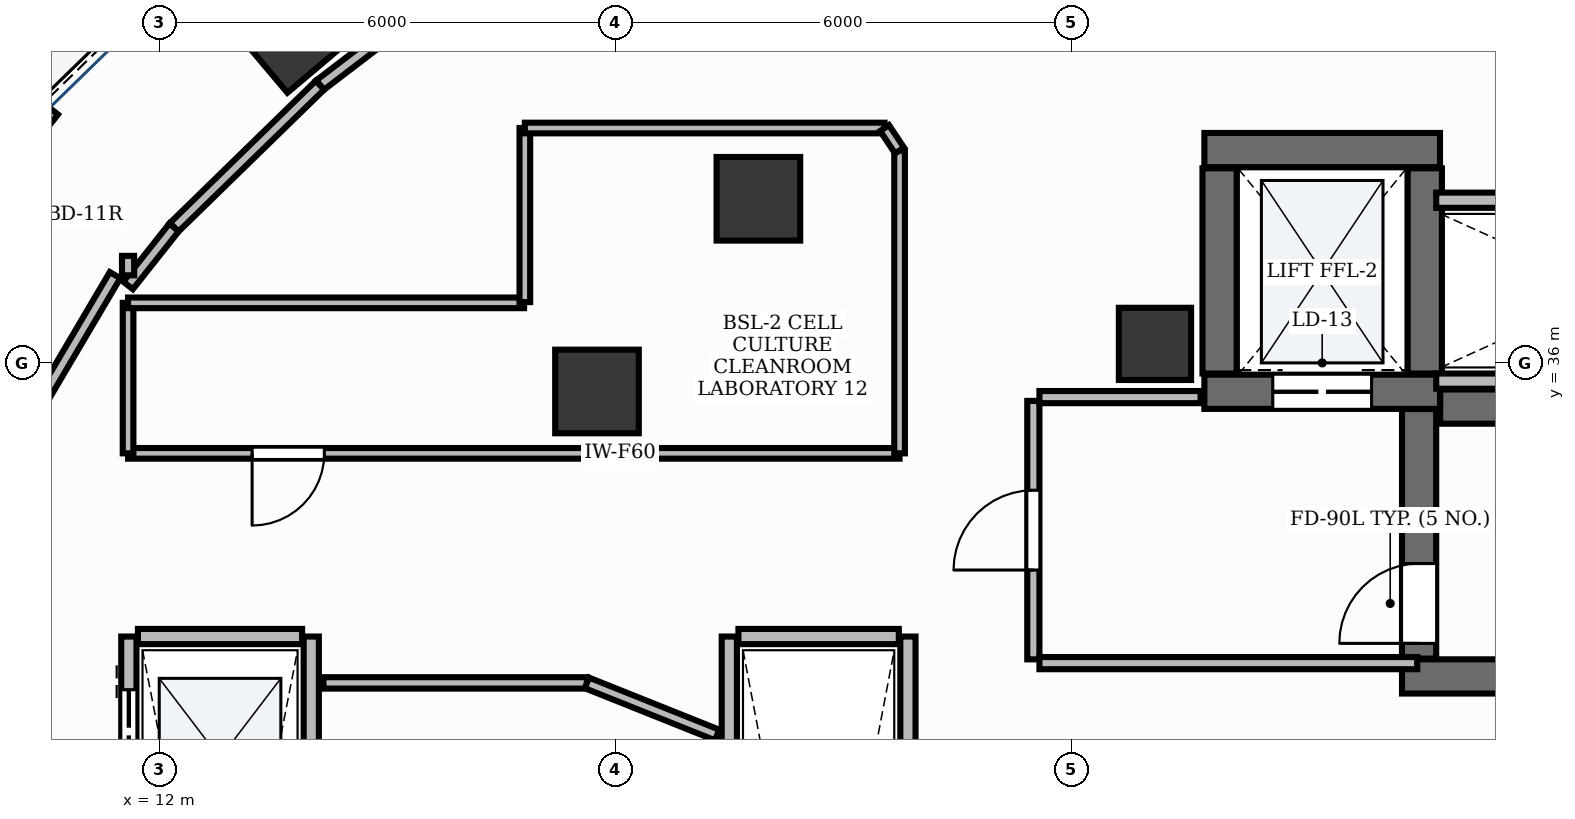
"""IFC4 building model, lengths in metres.
Left out: names, types, materials, properties, quantities, classifications, styles, units other than length and angle.
Written with IfcOpenShell. Run it as: python <this file> out.ifc"""

import sys

from ifc_helpers import new_model, si_unit, direction, frame, frame_2d, origin, origin_2d, place, context, subcontext, project, spatial, rectangle, extrude, element, fill, save


model = new_model("IFC4")
c1 = context("Model", 3, precision=1e-05, world=origin(), true_north=direction((0.0, 1.0)))
c2 = subcontext(c1, "Body", "Model", "MODEL_VIEW")
j1 = project(units=[si_unit("LENGTHUNIT", "METRE"), si_unit("PLANEANGLEUNIT", "RADIAN")], contexts=[c1])
p1 = place(None, origin())
s1 = spatial("IfcSite", under=j1, at=p1, CompositionType="ELEMENT")
p2 = place(p1, origin())
s2 = spatial("IfcBuilding", under=s1, at=p2, CompositionType="ELEMENT")
p3 = place(p2, frame((0.0, 0.0, 115.2)))
s3 = spatial("IfcBuildingStorey", under=s2, at=p3, CompositionType="ELEMENT", Elevation=115.2)
p4 = place(p3, frame((28.852, 35.425, 0.0), z_axis=(0.0, 0.0, 1.0), x_axis=(1.0, 0.0, 0.0)))
e1 = element("IfcWall", 1, at=p4, inside=s3, PredefinedType="SHEAR", context=c2, shape_type="SweptSolid", body=[
    extrude(rectangle(XDim=8.248, YDim=0.45, at=frame_2d((4.124, 0.0))), origin(), (0.0, 0.0, 1.0), 3.9),
])
p5 = place(p3, frame((28.35, 31.875, 0.0), z_axis=(0.0, 0.0, 1.0), x_axis=(1.0, 0.0, 0.0)))
e2 = element("IfcWall", 2, at=p5, inside=s3, PredefinedType="SHEAR", context=c2, shape_type="SweptSolid", body=[
    extrude(rectangle(XDim=8.75, YDim=0.45, at=frame_2d((4.375, 0.0))), origin(), (0.0, 0.0, 1.0), 3.9),
])
p6 = place(p3, frame((28.575, 32.11, 0.0), z_axis=(0.0, 0.0, 1.0), x_axis=(0.0, 1.0, 0.0)))
e3 = element("IfcWall", 3, at=p6, inside=s3, PredefinedType="SHEAR", context=c2, shape_type="SweptSolid", body=[
    extrude(rectangle(XDim=3.283, YDim=0.45, at=frame_2d((1.642, 0.0))), origin(), (0.0, 0.0, 1.0), 3.9),
])
p7 = place(p6, frame((0.2, 0.0, 0.0)))
e4 = element("IfcOpeningElement", 4, at=p7, cuts=e3, PredefinedType="OPENING", context=c2, shape_type="SweptSolid", body=[
    extrude(rectangle(XDim=1.05, YDim=2.15, at=frame_2d((0.525, 1.075))), frame((0.0, 0.24, 0.0), z_axis=(0.0, -1.0, 0.0), x_axis=(1.0, 0.0, 0.0)), (0.0, 0.0, 1.0), 0.48),
])
p8 = place(p3, frame((25.75, 38.8, 0.0), z_axis=(0.0, 0.0, 1.0), x_axis=(1.0, 0.0, 0.0)))
e5 = element("IfcWall", 5, at=p8, inside=s3, PredefinedType="SHEAR", context=c2, shape_type="SweptSolid", body=[
    extrude(rectangle(XDim=3.1, YDim=0.45, at=frame_2d((1.55, 0.0))), origin(), (0.0, 0.0, 1.0), 3.9),
])
p9 = place(p3, frame((25.75, 35.62, 0.0), z_axis=(0.0, 0.0, 1.0), x_axis=(1.0, 0.0, 0.0)))
e6 = element("IfcWall", 6, at=p9, inside=s3, PredefinedType="SHEAR", context=c2, shape_type="SweptSolid", body=[
    extrude(rectangle(XDim=3.1, YDim=0.45, at=frame_2d((1.55, 0.0))), origin(), (0.0, 0.0, 1.0), 3.9),
])
p10 = place(p9, frame((0.9, 0.0, 0.0)))
e7 = element("IfcOpeningElement", 7, at=p10, cuts=e6, PredefinedType="OPENING", context=c2, shape_type="SweptSolid", body=[
    extrude(rectangle(XDim=1.3, YDim=2.2, at=frame_2d((0.65, 1.1))), frame((0.0, 0.24, 0.0), z_axis=(0.0, -1.0, 0.0), x_axis=(1.0, 0.0, 0.0)), (0.0, 0.0, 1.0), 0.48),
])
for number, where, z_axis, x_axis in (
    (8, (25.95, 35.86, 0.0), (0.0, 0.0, 1.0), (0.0, 1.0, 0.0)),
    (9, (28.65, 35.86, 0.0), (0.0, 0.0, 1.0), (0.0, 1.0, 0.0)),
):
    element("IfcWall", number, at=place(p3, frame(where, z_axis=z_axis, x_axis=x_axis)), inside=s3, PredefinedType="SHEAR", context=c2, shape_type="SweptSolid", body=[
        extrude(rectangle(XDim=2.7, YDim=0.45, at=frame_2d((1.35, 0.0))), origin(), (0.0, 0.0, 1.0), 3.9),
    ])
p11 = place(p3, frame((25.1, 36.25, -0.0), z_axis=(0.0, 0.0, 1.0), x_axis=(1.0, 0.0, 0.0)))
e10 = element("IfcColumn", 10, at=p11, inside=s3, PredefinedType="PILASTER", context=c2, shape_type="SweptSolid", body=[
    extrude(rectangle(XDim=0.95, YDim=0.95, at=origin_2d()), origin(), (0.0, 0.0, 1.0), 3.901),
])
p12 = place(p3, frame((13.758, 40.4, -0.0), z_axis=(0.0, 0.0, 1.0), x_axis=(0.764246456939, 0.644924300253, 0.0)))
e11 = element("IfcColumn", 11, at=p12, inside=s3, PredefinedType="COLUMN", context=c2, shape_type="SweptSolid", body=[
    extrude(rectangle(XDim=1.2, YDim=1.2, at=origin_2d()), origin(), (0.0, 0.0, 1.0), 3.901),
])
for number, where, z_axis, x_axis in (
    (12, (19.883, 38.159, -0.0), (0.0, 0.0, 1.0), (1.0, 0.0, 0.0)),
    (13, (17.759, 35.624, -0.0), (0.0, 0.0, 1.0), (1.0, 0.0, 0.0)),
):
    element("IfcColumn", number, at=place(p3, frame(where, z_axis=z_axis, x_axis=x_axis)), inside=s3, PredefinedType="COLUMN", context=c2, shape_type="SweptSolid", body=[
        extrude(rectangle(XDim=1.1, YDim=1.1, at=origin_2d()), origin(), (0.0, 0.0, 1.0), 3.901),
    ])
p13 = place(p3, frame((10.55, 39.362, 0.0), z_axis=(0.0, 0.0, 1.0), x_axis=(-0.620971431761, -0.783833197139, 0.0)))
e14 = element("IfcWall", 14, at=p13, inside=s3, PredefinedType="STANDARD", context=c2, shape_type="SweptSolid", body=[
    extrude(rectangle(XDim=3.004, YDim=0.3, at=frame_2d((1.502, 0.0))), origin(), (0.0, 0.0, 1.0), 3.9),
])
p14 = place(p13, frame((0.952, 0.0, 0.0)))
e15 = element("IfcOpeningElement", 15, at=p14, cuts=e14, PredefinedType="OPENING", context=c2, shape_type="SweptSolid", body=[
    extrude(rectangle(XDim=1.1, YDim=2.15, at=frame_2d((0.55, 1.075))), frame((0.0, 0.165, 0.0), z_axis=(0.0, -1.0, 0.0), x_axis=(1.0, 0.0, 0.0)), (0.0, 0.0, 1.0), 0.33),
])
p15 = place(p3, frame((11.6, 21.6, 0.0), z_axis=(0.0, 0.0, 1.0), x_axis=(0.0, 1.0, 0.0)))
e16 = element("IfcWall", 16, at=p15, inside=s3, PredefinedType="PARTITIONING", context=c2, shape_type="SweptSolid", body=[
    extrude(rectangle(XDim=10.8, YDim=0.2, at=frame_2d((5.4, 0.0))), origin(), (0.0, 0.0, 1.0), 2.91),
])
p16 = place(p15, frame((0.9, 0.0, 0.0)))
e17 = element("IfcOpeningElement", 17, at=p16, cuts=e16, PredefinedType="OPENING", context=c2, shape_type="SweptSolid", body=[
    extrude(rectangle(XDim=1.1, YDim=2.2, at=frame_2d((0.55, 1.1))), frame((0.0, 0.115, 0.0), z_axis=(0.0, -1.0, 0.0), x_axis=(1.0, 0.0, 0.0)), (0.0, 0.0, 1.0), 0.23),
])
p17 = place(p15, frame((3.6, 0.0, 0.0)))
e18 = element("IfcOpeningElement", 18, at=p17, cuts=e16, PredefinedType="OPENING", context=c2, shape_type="SweptSolid", body=[
    extrude(rectangle(XDim=1.1, YDim=2.2, at=frame_2d((0.55, 1.1))), frame((0.0, 0.115, 0.0), z_axis=(0.0, -1.0, 0.0), x_axis=(1.0, 0.0, 0.0)), (0.0, 0.0, 1.0), 0.23),
])
p18 = place(p15, frame((6.3, 0.0, 0.0)))
e19 = element("IfcOpeningElement", 19, at=p18, cuts=e16, PredefinedType="OPENING", context=c2, shape_type="SweptSolid", body=[
    extrude(rectangle(XDim=1.1, YDim=2.2, at=frame_2d((0.55, 1.1))), frame((0.0, 0.115, 0.0), z_axis=(0.0, -1.0, 0.0), x_axis=(1.0, 0.0, 0.0)), (0.0, 0.0, 1.0), 0.23),
])
p19 = place(p15, frame((9.0, 0.0, 0.0)))
e20 = element("IfcOpeningElement", 20, at=p19, cuts=e16, PredefinedType="OPENING", context=c2, shape_type="SweptSolid", body=[
    extrude(rectangle(XDim=1.1, YDim=2.2, at=frame_2d((0.55, 1.1))), frame((0.0, 0.115, 0.0), z_axis=(0.0, -1.0, 0.0), x_axis=(1.0, 0.0, 0.0)), (0.0, 0.0, 1.0), 0.23),
])
p20 = place(p3, frame((14.0, 21.6, 0.0), z_axis=(0.0, 0.0, 1.0), x_axis=(0.0, 1.0, 0.0)))
e21 = element("IfcWall", 21, at=p20, inside=s3, PredefinedType="PARTITIONING", context=c2, shape_type="SweptSolid", body=[
    extrude(rectangle(XDim=10.8, YDim=0.2, at=frame_2d((5.4, 0.0))), origin(), (0.0, 0.0, 1.0), 2.91),
])
p21 = place(p3, frame((11.72, 32.4, 0.0), z_axis=(0.0, 0.0, 1.0), x_axis=(1.0, 0.0, 0.0)))
e22 = element("IfcWall", 22, at=p21, inside=s3, PredefinedType="PARTITIONING", context=c2, shape_type="SweptSolid", body=[
    extrude(rectangle(XDim=2.16, YDim=0.2, at=frame_2d((1.08, 0.0))), origin(), (0.0, 0.0, 1.0), 2.91),
])
for number, where, z_axis, x_axis in (
    (23, (19.5, 21.6, 0.0), (0.0, 0.0, 1.0), (0.0, 1.0, 0.0)),
    (24, (21.85, 21.6, 0.0), (0.0, 0.0, 1.0), (0.0, 1.0, 0.0)),
):
    element("IfcWall", number, at=place(p3, frame(where, z_axis=z_axis, x_axis=x_axis)), inside=s3, PredefinedType="PARTITIONING", context=c2, shape_type="SweptSolid", body=[
        extrude(rectangle(XDim=10.8, YDim=0.2, at=frame_2d((5.4, 0.0))), origin(), (0.0, 0.0, 1.0), 2.91),
    ])
p22 = place(p3, frame((19.62, 32.4, 0.0), z_axis=(0.0, 0.0, 1.0), x_axis=(1.0, 0.0, 0.0)))
e25 = element("IfcWall", 25, at=p22, inside=s3, PredefinedType="PARTITIONING", context=c2, shape_type="SweptSolid", body=[
    extrude(rectangle(XDim=2.11, YDim=0.2, at=frame_2d((1.055, 0.0))), origin(), (0.0, 0.0, 1.0), 2.91),
])
for number, where, z_axis, x_axis in (
    (26, (28.8, 35.76, 0.0), (0.0, 0.0, 1.0), (1.0, 0.0, 0.0)),
    (27, (28.8, 38.14, 0.0), (0.0, 0.0, 1.0), (1.0, 0.0, 0.0)),
):
    element("IfcWall", number, at=place(p3, frame(where, z_axis=z_axis, x_axis=x_axis)), inside=s3, PredefinedType="PARTITIONING", context=c2, shape_type="SweptSolid", body=[
        extrude(rectangle(XDim=4.57, YDim=0.2, at=frame_2d((2.285, 0.0))), origin(), (0.0, 0.0, 1.0), 2.91),
    ])
p23 = place(p3, frame((23.5, 32.1, 0.0), z_axis=(0.0, 0.0, 1.0), x_axis=(0.0, 1.0, 0.0)))
e28 = element("IfcWall", 28, at=p23, inside=s3, PredefinedType="PARTITIONING", context=c2, shape_type="SweptSolid", body=[
    extrude(rectangle(XDim=3.4, YDim=0.16, at=frame_2d((1.7, 0.0))), origin(), (0.0, 0.0, 1.0), 2.91),
])
p24 = place(p23, frame((1.175, 0.0, 0.0)))
e29 = element("IfcOpeningElement", 29, at=p24, cuts=e28, PredefinedType="OPENING", context=c2, shape_type="SweptSolid", body=[
    extrude(rectangle(XDim=1.05, YDim=2.15, at=frame_2d((0.525, 1.075))), frame((0.0, 0.095, 0.0), z_axis=(0.0, -1.0, 0.0), x_axis=(1.0, 0.0, 0.0)), (0.0, 0.0, 1.0), 0.19),
])
p25 = place(p3, frame((23.58, 32.05, 0.0), z_axis=(0.0, 0.0, 1.0), x_axis=(1.0, 0.0, 0.0)))
e30 = element("IfcWall", 30, at=p25, inside=s3, PredefinedType="PARTITIONING", context=c2, shape_type="SweptSolid", body=[
    extrude(rectangle(XDim=4.97, YDim=0.16, at=frame_2d((2.485, 0.0))), origin(), (0.0, 0.0, 1.0), 2.91),
])
p26 = place(p3, frame((23.58, 35.55, 0.0), z_axis=(0.0, 0.0, 1.0), x_axis=(1.0, 0.0, 0.0)))
e31 = element("IfcWall", 31, at=p26, inside=s3, PredefinedType="PARTITIONING", context=c2, shape_type="SweptSolid", body=[
    extrude(rectangle(XDim=2.12, YDim=0.16, at=frame_2d((1.06, 0.0))), origin(), (0.0, 0.0, 1.0), 2.91),
])
p27 = place(p3, frame((21.74, 34.81, 0.0), z_axis=(0.0, 0.0, 1.0), x_axis=(-1.0, 0.0, 0.0)))
e32 = element("IfcWall", 32, at=p27, inside=s3, PredefinedType="PARTITIONING", context=c2, shape_type="SweptSolid", body=[
    extrude(rectangle(XDim=10.15, YDim=0.14, at=frame_2d((5.075, 0.0))), origin(), (0.0, 0.0, 1.0), 2.91),
])
p28 = place(p27, frame((7.568, 0.0, 0.0)))
e33 = element("IfcOpeningElement", 33, at=p28, cuts=e32, PredefinedType="OPENING", context=c2, shape_type="SweptSolid", body=[
    extrude(rectangle(XDim=0.95, YDim=2.15, at=frame_2d((0.475, 1.075))), frame((0.0, 0.085, 0.0), z_axis=(0.0, -1.0, 0.0), x_axis=(1.0, 0.0, 0.0)), (0.0, 0.0, 1.0), 0.17),
])
p29 = place(p3, frame((14.16, 31.79, 0.0), z_axis=(0.0, 0.0, 1.0), x_axis=(1.0, 0.0, 0.0)))
e34 = element("IfcWall", 34, at=p29, inside=s3, PredefinedType="PARTITIONING", context=c2, shape_type="SweptSolid", body=[
    extrude(rectangle(XDim=3.467, YDim=0.15, at=frame_2d((1.733, 0.0))), origin(), (0.0, 0.0, 1.0), 2.91),
])
p30 = place(p3, frame((17.626, 31.79, 0.0), z_axis=(0.0, 0.0, 1.0), x_axis=(0.928485814786, -0.371367865789, 0.0)))
e35 = element("IfcWall", 35, at=p30, inside=s3, PredefinedType="PARTITIONING", context=c2, shape_type="SweptSolid", body=[
    extrude(rectangle(XDim=1.845, YDim=0.15, at=frame_2d((0.923, 0.0))), origin(), (0.0, 0.0, 1.0), 2.91),
])
p31 = place(p3, frame((16.339, 41.354, 0.0), z_axis=(0.0, 0.0, 1.0), x_axis=(-0.794513779695, -0.607246122981, 0.0)))
e36 = element("IfcWall", 36, at=p31, inside=s3, PredefinedType="PARTITIONING", context=c2, shape_type="SweptSolid", body=[
    extrude(rectangle(XDim=2.799, YDim=0.16, at=frame_2d((1.399, 0.0))), origin(), (0.0, 0.0, 1.0), 2.91),
])
p32 = place(p3, frame((14.114, 39.653, 0.0), z_axis=(0.0, 0.0, 1.0), x_axis=(-0.716161838398, -0.697934252794, 0.0)))
e37 = element("IfcWall", 37, at=p32, inside=s3, PredefinedType="PARTITIONING", context=c2, shape_type="SweptSolid", body=[
    extrude(rectangle(XDim=2.679, YDim=0.16, at=frame_2d((1.339, 0.0))), origin(), (0.0, 0.0, 1.0), 2.91),
])
p33 = place(p3, frame((12.195, 37.782, 0.0), z_axis=(0.0, 0.0, 1.0), x_axis=(-0.621081637991, -0.783745876513, 0.0)))
e38 = element("IfcWall", 38, at=p33, inside=s3, PredefinedType="PARTITIONING", context=c2, shape_type="SweptSolid", body=[
    extrude(rectangle(XDim=0.974, YDim=0.16, at=frame_2d((0.487, 0.0))), origin(), (0.0, 0.0, 1.0), 2.91),
])
p34 = place(p3, frame((11.59, 37.152, 0.0), z_axis=(0.0, 0.0, 1.0), x_axis=(0.0, 1.0, 0.0)))
e39 = element("IfcWall", 39, at=p34, inside=s3, PredefinedType="PARTITIONING", context=c2, shape_type="SweptSolid", body=[
    extrude(rectangle(XDim=0.256, YDim=0.16, at=frame_2d((0.128, 0.0))), origin(), (0.0, 0.0, 1.0), 2.91),
])
p35 = place(p3, frame((11.419, 37.154, 0.0), z_axis=(0.0, 0.0, 1.0), x_axis=(-0.508183269016, -0.861248956511, 0.0)))
e40 = element("IfcWall", 40, at=p35, inside=s3, PredefinedType="PARTITIONING", context=c2, shape_type="SweptSolid", body=[
    extrude(rectangle(XDim=4.053, YDim=0.16, at=frame_2d((2.026, 0.0))), origin(), (0.0, 0.0, 1.0), 2.91),
])
p36 = place(p3, frame((21.74, 38.793, 0.0), z_axis=(0.0, 0.0, 1.0), x_axis=(0.0, -1.0, 0.0)))
e41 = element("IfcWall", 41, at=p36, inside=s3, PredefinedType="PARTITIONING", context=c2, shape_type="SweptSolid", body=[
    extrude(rectangle(XDim=3.983, YDim=0.14, at=frame_2d((1.992, 0.0))), origin(), (0.0, 0.0, 1.0), 2.91),
])
p37 = place(p3, frame((11.59, 34.81, 0.0), z_axis=(0.0, 0.0, 1.0), x_axis=(0.0, 1.0, 0.0)))
e42 = element("IfcWall", 42, at=p37, inside=s3, PredefinedType="PARTITIONING", context=c2, shape_type="SweptSolid", body=[
    extrude(rectangle(XDim=1.98, YDim=0.14, at=frame_2d((0.99, 0.0))), origin(), (0.0, 0.0, 1.0), 2.91),
])
p38 = place(p3, frame((11.59, 36.79, 0.0), z_axis=(0.0, 0.0, 1.0), x_axis=(1.0, 0.0, 0.0)))
e43 = element("IfcWall", 43, at=p38, inside=s3, PredefinedType="PARTITIONING", context=c2, shape_type="SweptSolid", body=[
    extrude(rectangle(XDim=5.21, YDim=0.14, at=frame_2d((2.605, 0.0))), origin(), (0.0, 0.0, 1.0), 2.91),
])
p39 = place(p3, frame((16.81, 36.8, 0.0), z_axis=(0.0, 0.0, 1.0), x_axis=(0.0, 1.0, 0.0)))
e44 = element("IfcWall", 44, at=p39, inside=s3, PredefinedType="PARTITIONING", context=c2, shape_type="SweptSolid", body=[
    extrude(rectangle(XDim=2.29, YDim=0.14, at=frame_2d((1.145, 0.0))), origin(), (0.0, 0.0, 1.0), 2.91),
])
p40 = place(p3, frame((16.81, 39.09, 0.0), z_axis=(0.0, 0.0, 1.0), x_axis=(1.0, 0.0, 0.0)))
e45 = element("IfcWall", 45, at=p40, inside=s3, PredefinedType="PARTITIONING", context=c2, shape_type="SweptSolid", body=[
    extrude(rectangle(XDim=4.732, YDim=0.14, at=frame_2d((2.366, 0.0))), origin(), (0.0, 0.0, 1.0), 2.91),
])
p41 = place(p3, frame((21.542, 39.09, 0.0), z_axis=(0.0, 0.0, 1.0), x_axis=(0.554700196225, -0.832050294338, 0.0)))
e46 = element("IfcWall", 46, at=p41, inside=s3, PredefinedType="PARTITIONING", context=c2, shape_type="SweptSolid", body=[
    extrude(rectangle(XDim=0.356, YDim=0.14, at=frame_2d((0.178, 0.0))), origin(), (0.0, 0.0, 1.0), 2.91),
])
p42 = place(p7, origin())
e47 = element("IfcDoor", 47, at=p42, inside=s3, OperationType="SINGLE_SWING_LEFT", PredefinedType="DOOR", context=c2, shape_type="SweptSolid", body=[
    extrude(rectangle(XDim=1.05, YDim=2.15, at=frame_2d((0.525, 1.075))), frame((0.0, 0.025, 0.0), z_axis=(0.0, -1.0, 0.0), x_axis=(1.0, 0.0, 0.0)), (0.0, 0.0, 1.0), 0.05),
])
fill(e4, e47)
p43 = place(p19, origin())
e48 = element("IfcDoor", 48, at=p43, inside=s3, OperationType="DOUBLE_DOOR_SLIDING", PredefinedType="DOOR", context=c2, shape_type="SweptSolid", body=[
    extrude(rectangle(XDim=1.1, YDim=2.2, at=frame_2d((0.55, 1.1))), frame((0.0, 0.025, 0.0), z_axis=(0.0, -1.0, 0.0), x_axis=(1.0, 0.0, 0.0)), (0.0, 0.0, 1.0), 0.05),
])
fill(e20, e48)
p44 = place(p10, origin())
e49 = element("IfcDoor", 49, at=p44, inside=s3, OperationType="DOUBLE_DOOR_SLIDING", PredefinedType="DOOR", context=c2, shape_type="SweptSolid", body=[
    extrude(rectangle(XDim=1.3, YDim=2.2, at=frame_2d((0.65, 1.1))), frame((0.0, 0.025, 0.0), z_axis=(0.0, -1.0, 0.0), x_axis=(1.0, 0.0, 0.0)), (0.0, 0.0, 1.0), 0.05),
])
fill(e7, e49)
p45 = place(p24, origin())
e50 = element("IfcDoor", 50, at=p45, inside=s3, OperationType="SINGLE_SWING_LEFT", PredefinedType="DOOR", context=c2, shape_type="SweptSolid", body=[
    extrude(rectangle(XDim=1.05, YDim=2.15, at=frame_2d((0.525, 1.075))), frame((0.0, 0.025, 0.0), z_axis=(0.0, -1.0, 0.0), x_axis=(1.0, 0.0, 0.0)), (0.0, 0.0, 1.0), 0.05),
])
fill(e29, e50)
p46 = place(p28, origin())
e51 = element("IfcDoor", 51, at=p46, inside=s3, OperationType="SINGLE_SWING_RIGHT", PredefinedType="DOOR", context=c2, shape_type="SweptSolid", body=[
    extrude(rectangle(XDim=0.95, YDim=2.15, at=frame_2d((0.475, 1.075))), frame((0.0, 0.025, 0.0), z_axis=(0.0, -1.0, 0.0), x_axis=(1.0, 0.0, 0.0)), (0.0, 0.0, 1.0), 0.05),
])
fill(e33, e51)
save(model, sys.argv[1])
